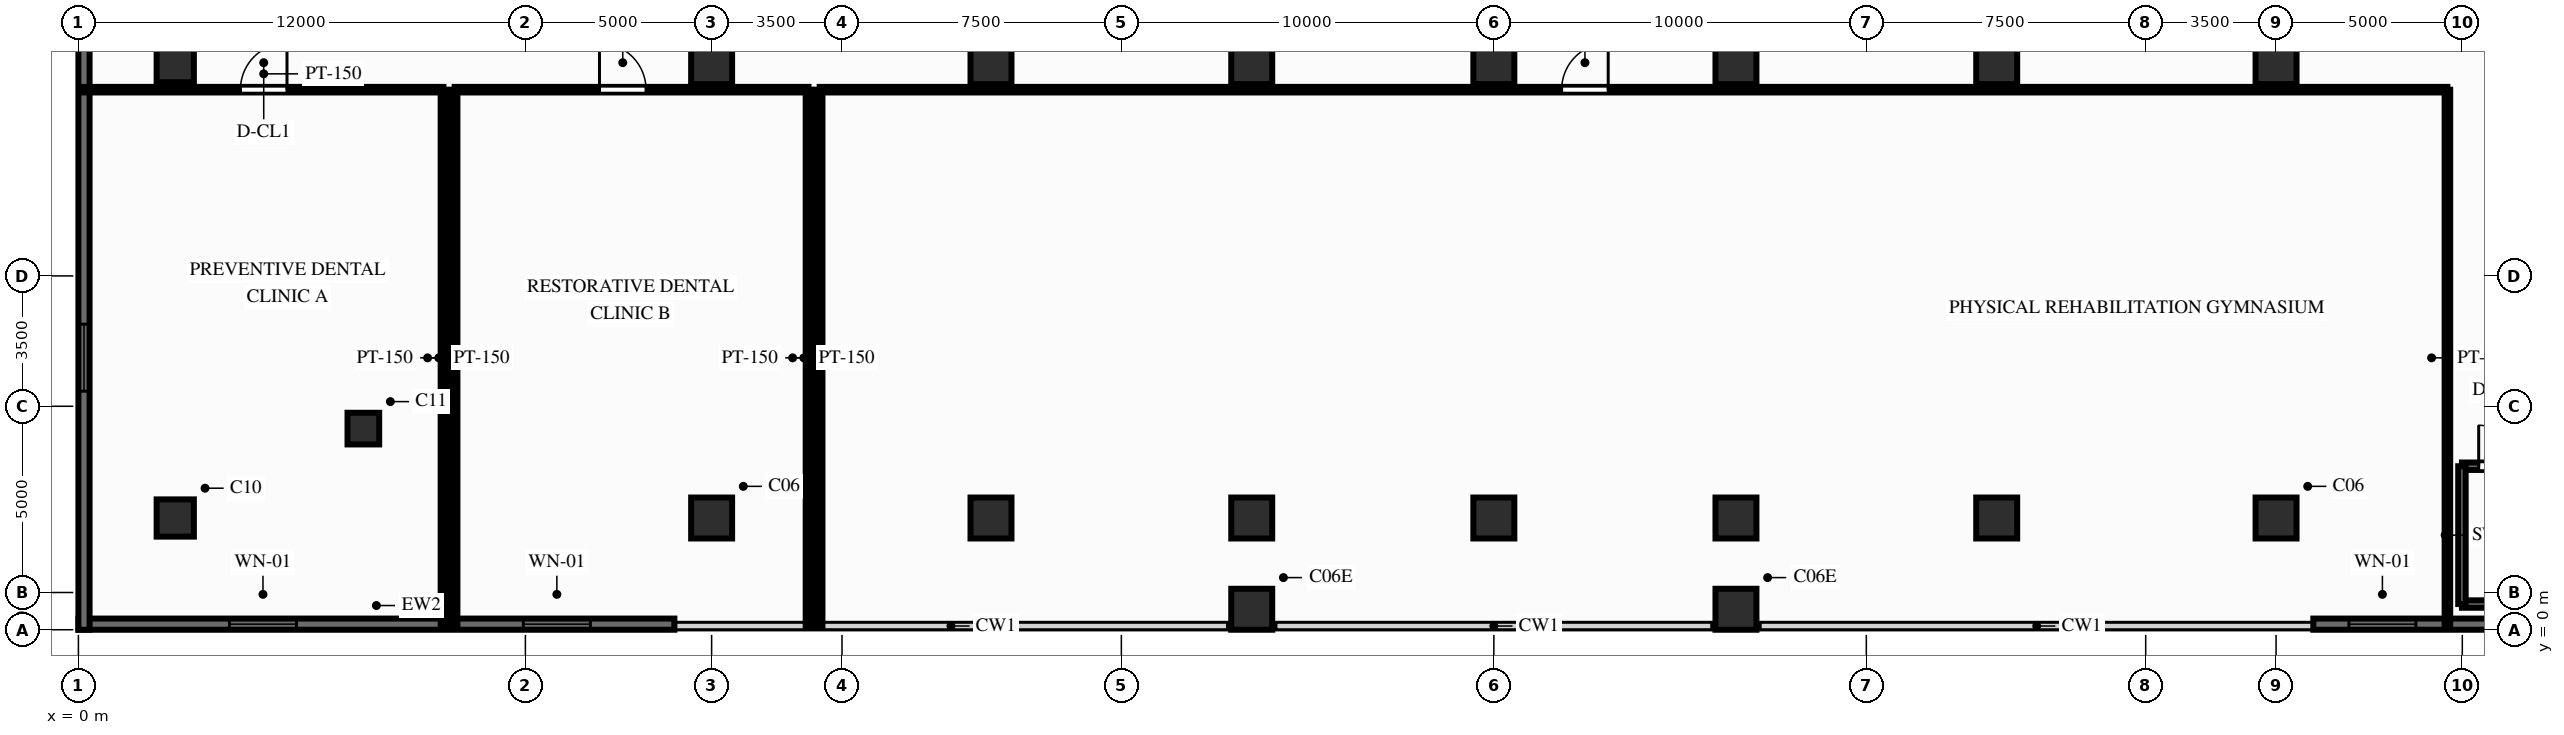
"""IFC4 building model, lengths in metres.
Left out: names, types, materials, properties, quantities, classifications, styles, units other than length and angle.
Written with IfcOpenShell. Run it as: python <this file> out.ifc"""

import sys

from ifc_helpers import new_model, si_unit, direction, frame, frame_2d, origin, origin_2d, place, context, subcontext, project, spatial, rectangle, circle, extrude, source, transform, mapped, element, fill, save


model = new_model("IFC4")
c1 = context("Model", 3, precision=1e-05, world=origin(), true_north=direction((0.0, 1.0)))
c2 = subcontext(c1, "Body", "Model", "MODEL_VIEW")
j1 = project(units=[si_unit("LENGTHUNIT", "METRE"), si_unit("PLANEANGLEUNIT", "RADIAN")], contexts=[c1])
p1 = place(None, origin())
s1 = spatial("IfcSite", under=j1, at=p1, CompositionType="ELEMENT")
p2 = place(p1, origin())
s2 = spatial("IfcBuilding", under=s1, at=p2, CompositionType="ELEMENT")
p3 = place(p2, frame((0.0, 0.0, 11.4)))
s3 = spatial("IfcBuildingStorey", under=s2, at=p3, CompositionType="ELEMENT", Elevation=11.4)
m1 = source(origin(), c2, "Body", "SweptSolid", [
    extrude(circle(Radius=0.5, at=origin_2d()), origin(), (0.0, 0.0, 1.0), 3.6),
])
for number, where, z_axis, x_axis in (
    (1, (2.6, 3.0, 0.0), (0.0, 0.0, 1.0), (1.0, 0.0, 0.0)),
    (2, (2.6, 15.2, 0.0), (0.0, 0.0, 1.0), (1.0, 0.0, 0.0)),
):
    element("IfcColumn", number, at=place(p3, frame(where, z_axis=z_axis, x_axis=x_axis)), inside=s3, PredefinedType="COLUMN", context=c2, shape_type="MappedRepresentation", body=[
        mapped(m1, transform((0.0, 0.0, 0.0), scale=1.0)),
    ])
m2 = source(origin(), c2, "Body", "SweptSolid", [
    extrude(circle(Radius=0.425, at=origin_2d()), origin(), (0.0, 0.0, 1.0), 3.6),
])
p4 = place(p3, frame((7.65, 5.4, 0.0), z_axis=(0.0, 0.0, 1.0), x_axis=(1.0, 0.0, 0.0)))
e3 = element("IfcColumn", 3, at=p4, inside=s3, PredefinedType="COLUMN", context=c2, shape_type="MappedRepresentation", body=[
    mapped(m2, transform((0.0, 0.0, 0.0), scale=1.0)),
])
m3 = source(origin(), c2, "Body", "SweptSolid", [
    extrude(rectangle(XDim=1.1, YDim=1.1, at=origin_2d()), origin(), (0.0, 0.0, 1.0), 3.6),
])
for number, where, z_axis, x_axis in (
    (4, (17.0, 3.0, 0.0), (0.0, 0.0, 1.0), (1.0, 0.0, 0.0)),
    (5, (59.0, 3.0, 0.0), (0.0, 0.0, 1.0), (1.0, 0.0, 0.0)),
    (6, (17.0, 15.2, 0.0), (0.0, 0.0, 1.0), (1.0, 0.0, 0.0)),
    (7, (59.0, 15.2, 0.0), (0.0, 0.0, 1.0), (1.0, 0.0, 0.0)),
    (8, (24.5, 3.0, 0.0), (0.0, 0.0, 1.0), (1.0, 0.0, 0.0)),
    (9, (24.5, 15.2, 0.0), (0.0, 0.0, 1.0), (1.0, 0.0, 0.0)),
    (10, (31.5, 0.55, 0.0), (0.0, 0.0, 1.0), (1.0, 0.0, 0.0)),
    (11, (31.5, 3.0, 0.0), (0.0, 0.0, 1.0), (1.0, 0.0, 0.0)),
    (12, (31.5, 15.2, 0.0), (0.0, 0.0, 1.0), (1.0, 0.0, 0.0)),
    (13, (38.0, 3.0, 0.0), (0.0, 0.0, 1.0), (1.0, 0.0, 0.0)),
    (14, (38.0, 15.2, 0.0), (0.0, 0.0, 1.0), (1.0, 0.0, 0.0)),
    (15, (44.5, 0.55, 0.0), (0.0, 0.0, 1.0), (1.0, 0.0, 0.0)),
    (16, (44.5, 3.0, 0.0), (0.0, 0.0, 1.0), (1.0, 0.0, 0.0)),
    (17, (44.5, 15.2, 0.0), (0.0, 0.0, 1.0), (1.0, 0.0, 0.0)),
    (18, (51.5, 3.0, 0.0), (0.0, 0.0, 1.0), (1.0, 0.0, 0.0)),
    (19, (51.5, 15.2, 0.0), (0.0, 0.0, 1.0), (1.0, 0.0, 0.0)),
):
    element("IfcColumn", number, at=place(p3, frame(where, z_axis=z_axis, x_axis=x_axis)), inside=s3, PredefinedType="COLUMN", context=c2, shape_type="MappedRepresentation", body=[
        mapped(m3, transform((0.0, 0.0, 0.0), scale=1.0)),
    ])
p5 = place(p3, frame((0.0, 0.15, 0.0), z_axis=(0.0, 0.0, 1.0), x_axis=(1.0, 0.0, 0.0)))
e20 = element("IfcWall", 20, at=p5, inside=s3, PredefinedType="SOLIDWALL", context=c2, shape_type="SweptSolid", body=[
    extrude(rectangle(XDim=16.0, YDim=0.3, at=frame_2d((8.0, 0.0))), origin(), (0.0, 0.0, 1.0), 2.88),
])
p6 = place(p5, frame((4.055, 0.0, 0.85)))
e21 = element("IfcOpeningElement", 21, at=p6, cuts=e20, PredefinedType="OPENING", context=c2, shape_type="SweptSolid", body=[
    extrude(rectangle(XDim=1.8, YDim=1.65, at=frame_2d((0.9, 0.825))), frame((0.0, 0.162, 0.0), z_axis=(0.0, -1.0, 0.0), x_axis=(1.0, 0.0, 0.0)), (0.0, 0.0, 1.0), 0.324),
])
p7 = place(p5, frame((11.945, 0.0, 0.85)))
e22 = element("IfcOpeningElement", 22, at=p7, cuts=e20, PredefinedType="OPENING", context=c2, shape_type="SweptSolid", body=[
    extrude(rectangle(XDim=1.8, YDim=1.65, at=frame_2d((0.9, 0.825))), frame((0.0, 0.162, 0.0), z_axis=(0.0, -1.0, 0.0), x_axis=(1.0, 0.0, 0.0)), (0.0, 0.0, 1.0), 0.324),
])
p8 = place(p3, frame((60.0, 0.15, 0.0), z_axis=(0.0, 0.0, 1.0), x_axis=(1.0, 0.0, 0.0)))
e23 = element("IfcWall", 23, at=p8, inside=s3, PredefinedType="SOLIDWALL", context=c2, shape_type="SweptSolid", body=[
    extrude(rectangle(XDim=16.0, YDim=0.3, at=frame_2d((8.0, 0.0))), origin(), (0.0, 0.0, 1.0), 2.88),
])
p9 = place(p8, frame((0.955, 0.0, 0.85)))
e24 = element("IfcOpeningElement", 24, at=p9, cuts=e23, PredefinedType="OPENING", context=c2, shape_type="SweptSolid", body=[
    extrude(rectangle(XDim=1.8, YDim=1.65, at=frame_2d((0.9, 0.825))), frame((0.0, 0.162, 0.0), z_axis=(0.0, -1.0, 0.0), x_axis=(1.0, 0.0, 0.0)), (0.0, 0.0, 1.0), 0.324),
])
p10 = place(p8, frame((6.705, 0.0, 0.85)))
e25 = element("IfcOpeningElement", 25, at=p10, cuts=e23, PredefinedType="OPENING", context=c2, shape_type="SweptSolid", body=[
    extrude(rectangle(XDim=1.8, YDim=1.65, at=frame_2d((0.9, 0.825))), frame((0.0, 0.162, 0.0), z_axis=(0.0, -1.0, 0.0), x_axis=(1.0, 0.0, 0.0)), (0.0, 0.0, 1.0), 0.324),
])
p11 = place(p8, frame((12.85, 0.0, 0.85)))
e26 = element("IfcOpeningElement", 26, at=p11, cuts=e23, PredefinedType="OPENING", context=c2, shape_type="SweptSolid", body=[
    extrude(rectangle(XDim=1.8, YDim=1.65, at=frame_2d((0.9, 0.825))), frame((0.0, 0.162, 0.0), z_axis=(0.0, -1.0, 0.0), x_axis=(1.0, 0.0, 0.0)), (0.0, 0.0, 1.0), 0.324),
])
p12 = place(p3, frame((0.15, 0.0, 0.0), z_axis=(0.0, 0.0, 1.0), x_axis=(0.0, 1.0, 0.0)))
e27 = element("IfcWall", 27, at=p12, inside=s3, PredefinedType="SOLIDWALL", context=c2, shape_type="SweptSolid", body=[
    extrude(rectangle(XDim=54.0, YDim=0.3, at=frame_2d((27.0, 0.0))), origin(), (0.0, 0.0, 1.0), 2.88),
])
p13 = place(p12, frame((6.405, 0.0, 0.85)))
e28 = element("IfcOpeningElement", 28, at=p13, cuts=e27, PredefinedType="OPENING", context=c2, shape_type="SweptSolid", body=[
    extrude(rectangle(XDim=1.8, YDim=1.65, at=frame_2d((0.9, 0.825))), frame((0.0, 0.162, 0.0), z_axis=(0.0, -1.0, 0.0), x_axis=(1.0, 0.0, 0.0)), (0.0, 0.0, 1.0), 0.324),
])
p14 = place(p12, frame((26.045, 0.0, 0.85)))
e29 = element("IfcOpeningElement", 29, at=p14, cuts=e27, PredefinedType="OPENING", context=c2, shape_type="SweptSolid", body=[
    extrude(rectangle(XDim=1.8, YDim=1.65, at=frame_2d((0.9, 0.825))), frame((0.0, 0.162, 0.0), z_axis=(0.0, -1.0, 0.0), x_axis=(1.0, 0.0, 0.0)), (0.0, 0.0, 1.0), 0.324),
])
p15 = place(p3, frame((63.99, 0.69, 0.0), z_axis=(0.0, 0.0, 1.0), x_axis=(1.0, 0.0, 0.0)))
e30 = element("IfcWall", 30, at=p15, inside=s3, PredefinedType="SOLIDWALL", context=c2, shape_type="SweptSolid", body=[
    extrude(rectangle(XDim=7.62, YDim=0.2, at=frame_2d((3.81, 0.0))), origin(), (0.0, 0.0, 1.0), 3.25),
])
p16 = place(p3, frame((63.99, 4.39, 0.0), z_axis=(0.0, 0.0, 1.0), x_axis=(1.0, 0.0, 0.0)))
e31 = element("IfcWall", 31, at=p16, inside=s3, PredefinedType="SOLIDWALL", context=c2, shape_type="SweptSolid", body=[
    extrude(rectangle(XDim=7.62, YDim=0.2, at=frame_2d((3.81, 0.0))), origin(), (0.0, 0.0, 1.0), 3.25),
])
p17 = place(p16, frame((0.45, 0.0, 0.0)))
e32 = element("IfcOpeningElement", 32, at=p17, cuts=e31, PredefinedType="OPENING", context=c2, shape_type="SweptSolid", body=[
    extrude(rectangle(XDim=1.1, YDim=2.15, at=frame_2d((0.55, 1.075))), frame((0.0, 0.112, 0.0), z_axis=(0.0, -1.0, 0.0), x_axis=(1.0, 0.0, 0.0)), (0.0, 0.0, 1.0), 0.224),
])
p18 = place(p3, frame((63.99, 0.69, 0.0), z_axis=(0.0, 0.0, 1.0), x_axis=(0.0, 1.0, 0.0)))
e33 = element("IfcWall", 33, at=p18, inside=s3, PredefinedType="SOLIDWALL", context=c2, shape_type="SweptSolid", body=[
    extrude(rectangle(XDim=3.7, YDim=0.2, at=frame_2d((1.85, 0.0))), origin(), (0.0, 0.0, 1.0), 3.25),
])
p19 = place(p3, frame((0.15, 14.5, 0.0), z_axis=(0.0, 0.0, 1.0), x_axis=(1.0, 0.0, 0.0)))
e34 = element("IfcWall", 34, at=p19, inside=s3, PredefinedType="PARTITIONING", context=c2, shape_type="SweptSolid", body=[
    extrude(rectangle(XDim=9.65, YDim=0.15, at=frame_2d((4.825, 0.0))), origin(), (0.0, 0.0, 1.0), 3.25),
])
p20 = place(p19, frame((4.2, 0.0, 0.0)))
e35 = element("IfcOpeningElement", 35, at=p20, cuts=e34, PredefinedType="OPENING", context=c2, shape_type="SweptSolid", body=[
    extrude(rectangle(XDim=1.25, YDim=2.15, at=frame_2d((0.625, 1.075))), frame((0.0, 0.087, 0.0), z_axis=(0.0, -1.0, 0.0), x_axis=(1.0, 0.0, 0.0)), (0.0, 0.0, 1.0), 0.174),
])
p21 = place(p3, frame((9.8, 0.1, 0.0), z_axis=(0.0, 0.0, 1.0), x_axis=(0.0, 1.0, 0.0)))
e36 = element("IfcWall", 36, at=p21, inside=s3, PredefinedType="PARTITIONING", context=c2, shape_type="SweptSolid", body=[
    extrude(rectangle(XDim=14.4, YDim=0.15, at=frame_2d((7.2, 0.0))), origin(), (0.0, 0.0, 1.0), 3.25),
])
p22 = place(p3, frame((10.1, 14.5, 0.0), z_axis=(0.0, 0.0, 1.0), x_axis=(1.0, 0.0, 0.0)))
e37 = element("IfcWall", 37, at=p22, inside=s3, PredefinedType="PARTITIONING", context=c2, shape_type="SweptSolid", body=[
    extrude(rectangle(XDim=9.5, YDim=0.15, at=frame_2d((4.75, 0.0))), origin(), (0.0, 0.0, 1.0), 3.25),
])
p23 = place(p22, frame((3.889, 0.0, 0.0)))
e38 = element("IfcOpeningElement", 38, at=p23, cuts=e37, PredefinedType="OPENING", context=c2, shape_type="SweptSolid", body=[
    extrude(rectangle(XDim=1.25, YDim=2.15, at=frame_2d((0.625, 1.075))), frame((0.0, 0.087, 0.0), z_axis=(0.0, -1.0, 0.0), x_axis=(1.0, 0.0, 0.0)), (0.0, 0.0, 1.0), 0.174),
])
for number, where, z_axis, x_axis in (
    (39, (10.1, 0.1, 0.0), (0.0, 0.0, 1.0), (0.0, 1.0, 0.0)),
    (40, (19.6, 0.1, 0.0), (0.0, 0.0, 1.0), (0.0, 1.0, 0.0)),
):
    element("IfcWall", number, at=place(p3, frame(where, z_axis=z_axis, x_axis=x_axis)), inside=s3, PredefinedType="PARTITIONING", context=c2, shape_type="SweptSolid", body=[
        extrude(rectangle(XDim=14.4, YDim=0.15, at=frame_2d((7.2, 0.0))), origin(), (0.0, 0.0, 1.0), 3.25),
    ])
p24 = place(p3, frame((19.9, 14.5, 0.0), z_axis=(0.0, 0.0, 1.0), x_axis=(1.0, 0.0, 0.0)))
e41 = element("IfcWall", 41, at=p24, inside=s3, PredefinedType="PARTITIONING", context=c2, shape_type="SweptSolid", body=[
    extrude(rectangle(XDim=43.7, YDim=0.15, at=frame_2d((21.85, 0.0))), origin(), (0.0, 0.0, 1.0), 3.25),
])
p25 = place(p24, frame((19.92, 0.0, 0.0)))
e42 = element("IfcOpeningElement", 42, at=p25, cuts=e41, PredefinedType="OPENING", context=c2, shape_type="SweptSolid", body=[
    extrude(rectangle(XDim=1.25, YDim=2.15, at=frame_2d((0.625, 1.075))), frame((0.0, 0.087, 0.0), z_axis=(0.0, -1.0, 0.0), x_axis=(1.0, 0.0, 0.0)), (0.0, 0.0, 1.0), 0.174),
])
for number, where, z_axis, x_axis in (
    (43, (19.9, 0.1, 0.0), (0.0, 0.0, 1.0), (0.0, 1.0, 0.0)),
    (44, (63.6, 0.1, 0.0), (0.0, 0.0, 1.0), (0.0, 1.0, 0.0)),
):
    element("IfcWall", number, at=place(p3, frame(where, z_axis=z_axis, x_axis=x_axis)), inside=s3, PredefinedType="PARTITIONING", context=c2, shape_type="SweptSolid", body=[
        extrude(rectangle(XDim=14.4, YDim=0.15, at=frame_2d((7.2, 0.0))), origin(), (0.0, 0.0, 1.0), 3.25),
    ])
m4 = source(origin(), c2, "Body", "SweptSolid", [
    extrude(rectangle(XDim=1.8, YDim=1.65, at=frame_2d((0.9, 0.825))), frame((0.0, 0.03, 0.0), z_axis=(0.0, -1.0, 0.0), x_axis=(1.0, 0.0, 0.0)), (0.0, 0.0, 1.0), 0.06),
])
p26 = place(p6, origin())
e45 = element("IfcWindow", 45, at=p26, inside=s3, PartitioningType="SINGLE_PANEL", PredefinedType="WINDOW", context=c2, shape_type="MappedRepresentation", body=[
    mapped(m4, transform((0.0, 0.0, 0.0), scale=1.0)),
])
fill(e21, e45)
p27 = place(p7, origin())
e46 = element("IfcWindow", 46, at=p27, inside=s3, PartitioningType="SINGLE_PANEL", PredefinedType="WINDOW", context=c2, shape_type="MappedRepresentation", body=[
    mapped(m4, transform((0.0, 0.0, 0.0), scale=1.0)),
])
fill(e22, e46)
p28 = place(p9, origin())
e47 = element("IfcWindow", 47, at=p28, inside=s3, PartitioningType="SINGLE_PANEL", PredefinedType="WINDOW", context=c2, shape_type="MappedRepresentation", body=[
    mapped(m4, transform((0.0, 0.0, 0.0), scale=1.0)),
])
fill(e24, e47)
p29 = place(p13, origin())
e48 = element("IfcWindow", 48, at=p29, inside=s3, PartitioningType="SINGLE_PANEL", PredefinedType="WINDOW", context=c2, shape_type="MappedRepresentation", body=[
    mapped(m4, transform((0.0, 0.0, 0.0), scale=1.0)),
])
fill(e28, e48)
m5 = source(origin(), c2, "Body", "SweptSolid", [
    extrude(rectangle(XDim=1.1, YDim=2.15, at=frame_2d((0.55, 1.075))), frame((0.0, 0.025, 0.0), z_axis=(0.0, -1.0, 0.0), x_axis=(1.0, 0.0, 0.0)), (0.0, 0.0, 1.0), 0.05),
])
p30 = place(p17, origin())
e49 = element("IfcDoor", 49, at=p30, inside=s3, OperationType="SINGLE_SWING_LEFT", PredefinedType="DOOR", context=c2, shape_type="MappedRepresentation", body=[
    mapped(m5, transform((0.0, 0.0, 0.0), scale=1.0)),
])
fill(e32, e49)
m6 = source(origin(), c2, "Body", "SweptSolid", [
    extrude(rectangle(XDim=1.25, YDim=2.15, at=frame_2d((0.625, 1.075))), frame((0.0, 0.025, 0.0), z_axis=(0.0, -1.0, 0.0), x_axis=(1.0, 0.0, 0.0)), (0.0, 0.0, 1.0), 0.05),
])
p31 = place(p20, origin())
e50 = element("IfcDoor", 50, at=p31, inside=s3, OperationType="SINGLE_SWING_RIGHT", PredefinedType="DOOR", context=c2, shape_type="MappedRepresentation", body=[
    mapped(m6, transform((0.0, 0.0, 0.0), scale=1.0)),
])
fill(e35, e50)
p32 = place(p23, origin())
e51 = element("IfcDoor", 51, at=p32, inside=s3, OperationType="SINGLE_SWING_LEFT", PredefinedType="DOOR", context=c2, shape_type="MappedRepresentation", body=[
    mapped(m6, transform((0.0, 0.0, 0.0), scale=1.0)),
])
fill(e38, e51)
p33 = place(p25, origin())
e52 = element("IfcDoor", 52, at=p33, inside=s3, OperationType="SINGLE_SWING_RIGHT", PredefinedType="DOOR", context=c2, shape_type="MappedRepresentation", body=[
    mapped(m6, transform((0.0, 0.0, 0.0), scale=1.0)),
])
fill(e42, e52)
save(model, sys.argv[1])
